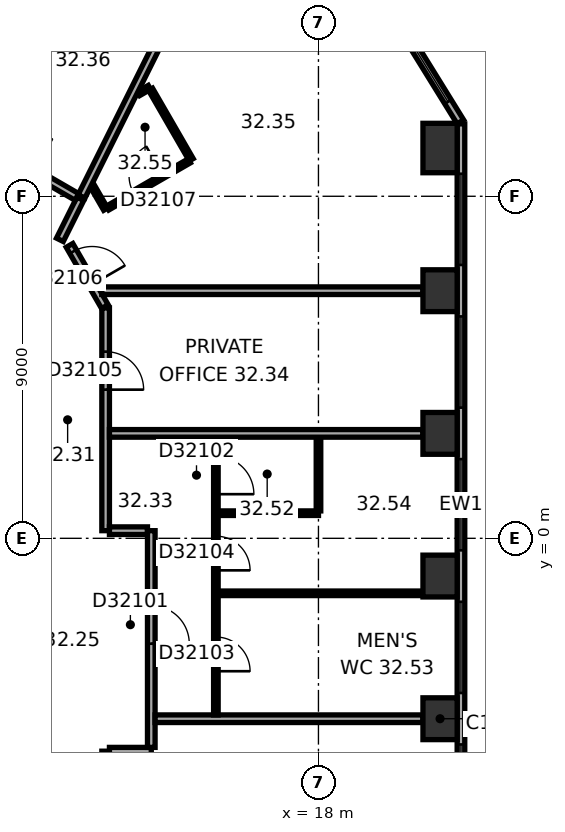
"""IFC4 building model, lengths in metres.
Left out: names, types, materials, properties, quantities, classifications, styles, units other than length and angle.
Written with IfcOpenShell. Run it as: python <this file> out.ifc"""

import sys

from ifc_helpers import new_model, si_unit, direction, frame, frame_2d, origin, origin_2d, place, context, subcontext, project, spatial, rectangle, extrude, element, fill, save


model = new_model("IFC4")
c1 = context("Model", 3, precision=1e-05, world=origin(), true_north=direction((0.0, 1.0)))
c2 = subcontext(c1, "Body", "Model", "MODEL_VIEW")
j1 = project(units=[si_unit("LENGTHUNIT", "METRE"), si_unit("PLANEANGLEUNIT", "RADIAN")], contexts=[c1])
p1 = place(None, origin())
s1 = spatial("IfcSite", under=j1, at=p1, CompositionType="ELEMENT")
p2 = place(p1, origin())
s2 = spatial("IfcBuilding", under=s1, at=p2, CompositionType="ELEMENT")
p3 = place(p2, frame((0.0, 0.0, 131.8)))
s3 = spatial("IfcBuildingStorey", under=s2, at=p3, CompositionType="ELEMENT", Elevation=131.8)
for number, where, z_axis, x_axis in (
    (1, (21.2, -4.747, 0.0), (0.0, 0.0, 1.0), (0.0, 1.0, 0.0)),
    (2, (21.2, -0.993, 0.0), (0.0, 0.0, 1.0), (0.0, 1.0, 0.0)),
    (3, (21.2, 2.761, 0.0), (0.0, 0.0, 1.0), (0.0, 1.0, 0.0)),
    (4, (21.2, 6.515, 0.0), (0.0, 0.0, 1.0), (0.0, 1.0, 0.0)),
):
    element("IfcColumn", number, at=place(p3, frame(where, z_axis=z_axis, x_axis=x_axis)), inside=s3, PredefinedType="COLUMN", context=c2, shape_type="SweptSolid", body=[
        extrude(rectangle(XDim=1.1, YDim=0.9, at=origin_2d()), origin(), (0.0, 0.0, 1.0), 3.7),
    ])
p4 = place(p3, frame((21.2, 10.27, 0.0), z_axis=(0.0, 0.0, 1.0), x_axis=(0.0, 1.0, 0.0)))
e5 = element("IfcColumn", 5, at=p4, inside=s3, PredefinedType="COLUMN", context=c2, shape_type="SweptSolid", body=[
    extrude(rectangle(XDim=1.3, YDim=0.9, at=origin_2d()), origin(), (0.0, 0.0, 1.0), 3.7),
])
p5 = place(p3, frame((21.75, -9.138, 0.0), z_axis=(0.0, 0.0, 1.0), x_axis=(0.0, 1.0, 0.0)))
e6 = element("IfcWall", 6, at=p5, inside=s3, PredefinedType="STANDARD", context=c2, shape_type="SweptSolid", body=[
    extrude(rectangle(XDim=20.044, YDim=0.2, at=frame_2d((10.022, 0.0))), origin(), (0.0, 0.0, 1.0), 3.7),
])
p6 = place(p5, frame((1.314, 0.0, 0.9)))
e7 = element("IfcOpeningElement", 7, at=p6, cuts=e6, PredefinedType="OPENING", context=c2, shape_type="SweptSolid", body=[
    extrude(rectangle(XDim=2.4, YDim=2.0, at=frame_2d((1.2, 1.0))), frame((0.0, 0.11, 0.0), z_axis=(0.0, -1.0, 0.0), x_axis=(1.0, 0.0, 0.0)), (0.0, 0.0, 1.0), 0.22),
])
p7 = place(p5, frame((5.069, 0.0, 0.9)))
e8 = element("IfcOpeningElement", 8, at=p7, cuts=e6, PredefinedType="OPENING", context=c2, shape_type="SweptSolid", body=[
    extrude(rectangle(XDim=2.4, YDim=2.0, at=frame_2d((1.2, 1.0))), frame((0.0, 0.11, 0.0), z_axis=(0.0, -1.0, 0.0), x_axis=(1.0, 0.0, 0.0)), (0.0, 0.0, 1.0), 0.22),
])
p8 = place(p5, frame((8.823, 0.0, 0.9)))
e9 = element("IfcOpeningElement", 9, at=p8, cuts=e6, PredefinedType="OPENING", context=c2, shape_type="SweptSolid", body=[
    extrude(rectangle(XDim=2.4, YDim=2.0, at=frame_2d((1.2, 1.0))), frame((0.0, 0.11, 0.0), z_axis=(0.0, -1.0, 0.0), x_axis=(1.0, 0.0, 0.0)), (0.0, 0.0, 1.0), 0.22),
])
p9 = place(p5, frame((12.577, 0.0, 0.9)))
e10 = element("IfcOpeningElement", 10, at=p9, cuts=e6, PredefinedType="OPENING", context=c2, shape_type="SweptSolid", body=[
    extrude(rectangle(XDim=2.4, YDim=2.0, at=frame_2d((1.2, 1.0))), frame((0.0, 0.11, 0.0), z_axis=(0.0, -1.0, 0.0), x_axis=(1.0, 0.0, 0.0)), (0.0, 0.0, 1.0), 0.22),
])
p10 = place(p5, frame((16.331, 0.0, 0.9)))
e11 = element("IfcOpeningElement", 11, at=p10, cuts=e6, PredefinedType="OPENING", context=c2, shape_type="SweptSolid", body=[
    extrude(rectangle(XDim=2.4, YDim=2.0, at=frame_2d((1.2, 1.0))), frame((0.0, 0.11, 0.0), z_axis=(0.0, -1.0, 0.0), x_axis=(1.0, 0.0, 0.0)), (0.0, 0.0, 1.0), 0.22),
])
p11 = place(p3, frame((21.735, 10.958, 0.0), z_axis=(0.0, 0.0, 1.0), x_axis=(-0.526213807775, 0.850352296702, 0.0)))
e12 = element("IfcWall", 12, at=p11, inside=s3, PredefinedType="STANDARD", context=c2, shape_type="SweptSolid", body=[
    extrude(rectangle(XDim=4.238, YDim=0.2, at=frame_2d((2.119, 0.0))), origin(), (0.0, 0.0, 1.0), 3.7),
])
p12 = place(p11, frame((0.619, 0.0, 0.9)))
e13 = element("IfcOpeningElement", 13, at=p12, cuts=e12, PredefinedType="OPENING", context=c2, shape_type="SweptSolid", body=[
    extrude(rectangle(XDim=3.0, YDim=2.0, at=frame_2d((1.5, 1.0))), frame((0.0, 0.11, 0.0), z_axis=(0.0, -1.0, 0.0), x_axis=(1.0, 0.0, 0.0)), (0.0, 0.0, 1.0), 0.22),
])
p13 = place(p3, frame((11.196, 7.854, 0.0), z_axis=(0.0, 0.0, 1.0), x_axis=(0.446241040303, 0.894912808015, 0.0)))
e14 = element("IfcWall", 14, at=p13, inside=s3, PredefinedType="PARTITIONING", context=c2, shape_type="SweptSolid", body=[
    extrude(rectangle(XDim=1.205, YDim=0.2, at=frame_2d((0.603, 0.0))), origin(), (0.0, 0.0, 1.0), 3.42),
])
p14 = place(p3, frame((11.646, 8.981, 0.0), z_axis=(0.0, 0.0, 1.0), x_axis=(-0.866027142779, 0.499996987961, 0.0)))
e15 = element("IfcWall", 15, at=p14, inside=s3, PredefinedType="PARTITIONING", context=c2, shape_type="SweptSolid", body=[
    extrude(rectangle(XDim=9.597, YDim=0.2, at=frame_2d((4.798, 0.0))), origin(), (0.0, 0.0, 1.0), 3.42),
])
p15 = place(p14, frame((1.331, 0.0, 0.0)))
e16 = element("IfcOpeningElement", 16, at=p15, cuts=e15, PredefinedType="OPENING", context=c2, shape_type="SweptSolid", body=[
    extrude(rectangle(XDim=1.0, YDim=2.1, at=frame_2d((0.5, 1.05))), frame((0.0, 0.11, 0.0), z_axis=(0.0, -1.0, 0.0), x_axis=(1.0, 0.0, 0.0)), (0.0, 0.0, 1.0), 0.22),
])
p16 = place(p14, frame((5.042, 0.0, 0.0)))
e17 = element("IfcOpeningElement", 17, at=p16, cuts=e15, PredefinedType="OPENING", context=c2, shape_type="SweptSolid", body=[
    extrude(rectangle(XDim=1.0, YDim=2.1, at=frame_2d((0.5, 1.05))), frame((0.0, 0.11, 0.0), z_axis=(0.0, -1.0, 0.0), x_axis=(1.0, 0.0, 0.0)), (0.0, 0.0, 1.0), 0.22),
])
p17 = place(p14, frame((8.01, 0.0, 0.0)))
e18 = element("IfcOpeningElement", 18, at=p17, cuts=e15, PredefinedType="OPENING", context=c2, shape_type="SweptSolid", body=[
    extrude(rectangle(XDim=1.0, YDim=2.1, at=frame_2d((0.5, 1.05))), frame((0.0, 0.11, 0.0), z_axis=(0.0, -1.0, 0.0), x_axis=(1.0, 0.0, 0.0)), (0.0, 0.0, 1.0), 0.22),
])
p18 = place(p3, frame((11.73, 17.338, 0.0), z_axis=(0.0, 0.0, 1.0), x_axis=(-0.446193589186, -0.894936467561, 0.0)))
e19 = element("IfcWall", 19, at=p18, inside=s3, PredefinedType="PARTITIONING", context=c2, shape_type="SweptSolid", body=[
    extrude(rectangle(XDim=7.183, YDim=0.2, at=frame_2d((3.591, 0.0))), origin(), (0.0, 0.0, 1.0), 2.87),
])
p19 = place(p3, frame((12.38, 6.097, 0.0), z_axis=(0.0, 0.0, 1.0), x_axis=(-0.499964847546, 0.866045698112, 0.0)))
e20 = element("IfcWall", 20, at=p19, inside=s3, PredefinedType="PARTITIONING", context=c2, shape_type="SweptSolid", body=[
    extrude(rectangle(XDim=1.86, YDim=0.2, at=frame_2d((0.93, 0.0))), origin(), (0.0, 0.0, 1.0), 3.42),
])
p20 = place(p19, frame((0.672, 0.0, 0.0)))
e21 = element("IfcOpeningElement", 21, at=p20, cuts=e20, PredefinedType="OPENING", context=c2, shape_type="SweptSolid", body=[
    extrude(rectangle(XDim=1.0, YDim=2.1, at=frame_2d((0.5, 1.05))), frame((0.0, 0.11, 0.0), z_axis=(0.0, -1.0, 0.0), x_axis=(1.0, 0.0, 0.0)), (0.0, 0.0, 1.0), 0.22),
])
p21 = place(p3, frame((12.4, -6.022, 0.0), z_axis=(0.0, 0.0, 1.0), x_axis=(0.0, 1.0, 0.0)))
e22 = element("IfcWall", 22, at=p21, inside=s3, PredefinedType="PARTITIONING", context=c2, shape_type="SweptSolid", body=[
    extrude(rectangle(XDim=0.421, YDim=0.2, at=frame_2d((0.21, 0.0))), origin(), (0.0, 0.0, 1.0), 3.42),
])
p22 = place(p3, frame((12.4, 0.201, 0.0), z_axis=(0.0, 0.0, 1.0), x_axis=(0.0, 1.0, 0.0)))
e23 = element("IfcWall", 23, at=p22, inside=s3, PredefinedType="PARTITIONING", context=c2, shape_type="SweptSolid", body=[
    extrude(rectangle(XDim=5.861, YDim=0.2, at=frame_2d((2.931, 0.0))), origin(), (0.0, 0.0, 1.0), 3.42),
])
p23 = place(p22, frame((3.711, 0.0, 0.0)))
e24 = element("IfcOpeningElement", 24, at=p23, cuts=e23, PredefinedType="OPENING", context=c2, shape_type="SweptSolid", body=[
    extrude(rectangle(XDim=1.0, YDim=2.1, at=frame_2d((0.5, 1.05))), frame((0.0, 0.11, 0.0), z_axis=(0.0, -1.0, 0.0), x_axis=(1.0, 0.0, 0.0)), (0.0, 0.0, 1.0), 0.22),
])
p24 = place(p3, frame((12.401, 8.661, 0.0), z_axis=(0.0, 0.0, 1.0), x_axis=(-0.499831418649, 0.866122712398, 0.0)))
e25 = element("IfcWall", 25, at=p24, inside=s3, PredefinedType="PARTITIONING", context=c2, shape_type="SweptSolid", body=[
    extrude(rectangle(XDim=0.711, YDim=0.12, at=frame_2d((0.355, 0.0))), origin(), (0.0, 0.0, 1.0), 3.42),
])
p25 = place(p3, frame((12.5, -5.601, 0.0), z_axis=(0.0, 0.0, 1.0), x_axis=(1.0, 0.0, 0.0)))
e26 = element("IfcWall", 26, at=p25, inside=s3, PredefinedType="PARTITIONING", context=c2, shape_type="SweptSolid", body=[
    extrude(rectangle(XDim=1.101, YDim=0.2, at=frame_2d((0.551, 0.0))), origin(), (0.0, 0.0, 1.0), 3.42),
])
p26 = place(p3, frame((13.269, 11.702, 0.0), z_axis=(0.0, 0.0, 1.0), x_axis=(0.865936922628, 0.500153222552, 0.0)))
e27 = element("IfcWall", 27, at=p26, inside=s3, PredefinedType="PARTITIONING", context=c2, shape_type="SweptSolid", body=[
    extrude(rectangle(XDim=0.327, YDim=0.12, at=frame_2d((0.164, 0.0))), origin(), (0.0, 0.0, 1.0), 3.42),
])
p27 = place(p3, frame((13.501, 0.201, 0.0), z_axis=(0.0, 0.0, 1.0), x_axis=(-1.0, 0.0, 0.0)))
e28 = element("IfcWall", 28, at=p27, inside=s3, PredefinedType="PARTITIONING", context=c2, shape_type="SweptSolid", body=[
    extrude(rectangle(XDim=1.001, YDim=0.2, at=frame_2d((0.5, 0.0))), origin(), (0.0, 0.0, 1.0), 3.42),
])
p28 = place(p3, frame((13.583, 11.814, 0.0), z_axis=(0.0, 0.0, 1.0), x_axis=(0.500028586798, -0.86600889856, 0.0)))
e29 = element("IfcWall", 29, at=p28, inside=s3, PredefinedType="PARTITIONING", context=c2, shape_type="SweptSolid", body=[
    extrude(rectangle(XDim=2.14, YDim=0.12, at=frame_2d((1.07, 0.0))), origin(), (0.0, 0.0, 1.0), 3.42),
])
p29 = place(p3, frame((13.601, -5.501, 0.0), z_axis=(0.0, 0.0, 1.0), x_axis=(0.0, 1.0, 0.0)))
e30 = element("IfcWall", 30, at=p29, inside=s3, PredefinedType="PARTITIONING", context=c2, shape_type="SweptSolid", body=[
    extrude(rectangle(XDim=5.702, YDim=0.2, at=frame_2d((2.851, 0.0))), origin(), (0.0, 0.0, 1.0), 3.42),
])
p30 = place(p29, frame((2.728, 0.0, 0.0)))
e31 = element("IfcOpeningElement", 31, at=p30, cuts=e30, PredefinedType="OPENING", context=c2, shape_type="SweptSolid", body=[
    extrude(rectangle(XDim=1.0, YDim=2.1, at=frame_2d((0.5, 1.05))), frame((0.0, 0.11, 0.0), z_axis=(0.0, -1.0, 0.0), x_axis=(1.0, 0.0, 0.0)), (0.0, 0.0, 1.0), 0.22),
])
p31 = place(p3, frame((13.701, -4.747, 0.0), z_axis=(0.0, 0.0, 1.0), x_axis=(1.0, 0.0, 0.0)))
e32 = element("IfcWall", 32, at=p31, inside=s3, PredefinedType="PARTITIONING", context=c2, shape_type="SweptSolid", body=[
    extrude(rectangle(XDim=7.049, YDim=0.2, at=frame_2d((3.524, 0.0))), origin(), (0.0, 0.0, 1.0), 3.42),
])
p32 = place(p3, frame((14.601, 9.931, 0.0), z_axis=(0.0, 0.0, 1.0), x_axis=(-0.866023285932, -0.50000366821, 0.0)))
e33 = element("IfcWall", 33, at=p32, inside=s3, PredefinedType="PARTITIONING", context=c2, shape_type="SweptSolid", body=[
    extrude(rectangle(XDim=2.48, YDim=0.12, at=frame_2d((1.24, 0.0))), origin(), (0.0, 0.0, 1.0), 3.42),
])
p33 = place(p32, frame((0.79, 0.0, 0.0)))
e34 = element("IfcOpeningElement", 34, at=p33, cuts=e33, PredefinedType="OPENING", context=c2, shape_type="SweptSolid", body=[
    extrude(rectangle(XDim=0.9, YDim=2.1, at=frame_2d((0.45, 1.05))), frame((0.0, 0.07, 0.0), z_axis=(0.0, -1.0, 0.0), x_axis=(1.0, 0.0, 0.0)), (0.0, 0.0, 1.0), 0.14),
])
p34 = place(p3, frame((15.09, 15.663, 0.0), z_axis=(0.0, 0.0, 1.0), x_axis=(-0.446203977428, -0.89493128816, 0.0)))
e35 = element("IfcWall", 35, at=p34, inside=s3, PredefinedType="PARTITIONING", context=c2, shape_type="SweptSolid", body=[
    extrude(rectangle(XDim=7.45, YDim=0.2, at=frame_2d((3.725, 0.0))), origin(), (0.0, 0.0, 1.0), 3.42),
])
p35 = place(p3, frame((15.301, -4.647, 0.0), z_axis=(0.0, 0.0, 1.0), x_axis=(0.0, 1.0, 0.0)))
e36 = element("IfcWall", 36, at=p35, inside=s3, PredefinedType="PARTITIONING", context=c2, shape_type="SweptSolid", body=[
    extrude(rectangle(XDim=7.308, YDim=0.12, at=frame_2d((3.654, 0.0))), origin(), (0.0, 0.0, 1.0), 3.42),
])
p36 = place(p35, frame((5.808, 0.0, 0.0)))
e37 = element("IfcOpeningElement", 37, at=p36, cuts=e36, PredefinedType="OPENING", context=c2, shape_type="SweptSolid", body=[
    extrude(rectangle(XDim=1.0, YDim=2.1, at=frame_2d((0.5, 1.05))), frame((0.0, 0.07, 0.0), z_axis=(0.0, -1.0, 0.0), x_axis=(1.0, 0.0, 0.0)), (0.0, 0.0, 1.0), 0.14),
])
p37 = place(p35, frame((1.15, 0.0, 0.0)))
e38 = element("IfcOpeningElement", 38, at=p37, cuts=e36, PredefinedType="OPENING", context=c2, shape_type="SweptSolid", body=[
    extrude(rectangle(XDim=0.9, YDim=2.1, at=frame_2d((0.45, 1.05))), frame((0.0, 0.07, 0.0), z_axis=(0.0, -1.0, 0.0), x_axis=(1.0, 0.0, 0.0)), (0.0, 0.0, 1.0), 0.14),
])
p38 = place(p35, frame((3.804, 0.0, 0.0)))
e39 = element("IfcOpeningElement", 39, at=p38, cuts=e36, PredefinedType="OPENING", context=c2, shape_type="SweptSolid", body=[
    extrude(rectangle(XDim=0.9, YDim=2.1, at=frame_2d((0.45, 1.05))), frame((0.0, 0.07, 0.0), z_axis=(0.0, -1.0, 0.0), x_axis=(1.0, 0.0, 0.0)), (0.0, 0.0, 1.0), 0.14),
])
p39 = place(p3, frame((15.361, 0.661, 0.0), z_axis=(0.0, 0.0, 1.0), x_axis=(1.0, 0.0, 0.0)))
e40 = element("IfcWall", 40, at=p39, inside=s3, PredefinedType="PARTITIONING", context=c2, shape_type="SweptSolid", body=[
    extrude(rectangle(XDim=2.64, YDim=0.12, at=frame_2d((1.32, 0.0))), origin(), (0.0, 0.0, 1.0), 3.42),
])
p40 = place(p3, frame((18.001, 0.721, 0.0), z_axis=(0.0, 0.0, 1.0), x_axis=(0.0, 1.0, 0.0)))
e41 = element("IfcWall", 41, at=p40, inside=s3, PredefinedType="PARTITIONING", context=c2, shape_type="SweptSolid", body=[
    extrude(rectangle(XDim=1.94, YDim=0.12, at=frame_2d((0.97, 0.0))), origin(), (0.0, 0.0, 1.0), 3.42),
])
p41 = place(p3, frame((20.75, -1.447, 0.0), z_axis=(0.0, 0.0, 1.0), x_axis=(-1.0, 0.0, 0.0)))
e42 = element("IfcWall", 42, at=p41, inside=s3, PredefinedType="PARTITIONING", context=c2, shape_type="SweptSolid", body=[
    extrude(rectangle(XDim=5.389, YDim=0.12, at=frame_2d((2.694, 0.0))), origin(), (0.0, 0.0, 1.0), 2.87),
])
p42 = place(p3, frame((20.75, 2.761, 0.0), z_axis=(0.0, 0.0, 1.0), x_axis=(-1.0, 0.0, 0.0)))
e43 = element("IfcWall", 43, at=p42, inside=s3, PredefinedType="PARTITIONING", context=c2, shape_type="SweptSolid", body=[
    extrude(rectangle(XDim=8.25, YDim=0.2, at=frame_2d((4.125, 0.0))), origin(), (0.0, 0.0, 1.0), 3.42),
])
p43 = place(p3, frame((20.75, 6.515, 0.0), z_axis=(0.0, 0.0, 1.0), x_axis=(-1.0, 0.0, 0.0)))
e44 = element("IfcWall", 44, at=p43, inside=s3, PredefinedType="PARTITIONING", context=c2, shape_type="SweptSolid", body=[
    extrude(rectangle(XDim=8.452, YDim=0.2, at=frame_2d((4.226, 0.0))), origin(), (0.0, 0.0, 1.0), 3.42),
])
p44 = place(p6, origin())
e45 = element("IfcWindow", 45, at=p44, inside=s3, PartitioningType="SINGLE_PANEL", PredefinedType="WINDOW", context=c2, shape_type="SweptSolid", body=[
    extrude(rectangle(XDim=2.4, YDim=2.0, at=frame_2d((1.2, 1.0))), frame((0.0, 0.03, 0.0), z_axis=(0.0, -1.0, 0.0), x_axis=(1.0, 0.0, 0.0)), (0.0, 0.0, 1.0), 0.06),
])
fill(e7, e45)
p45 = place(p7, origin())
e46 = element("IfcWindow", 46, at=p45, inside=s3, PartitioningType="SINGLE_PANEL", PredefinedType="WINDOW", context=c2, shape_type="SweptSolid", body=[
    extrude(rectangle(XDim=2.4, YDim=2.0, at=frame_2d((1.2, 1.0))), frame((0.0, 0.03, 0.0), z_axis=(0.0, -1.0, 0.0), x_axis=(1.0, 0.0, 0.0)), (0.0, 0.0, 1.0), 0.06),
])
fill(e8, e46)
p46 = place(p8, origin())
e47 = element("IfcWindow", 47, at=p46, inside=s3, PartitioningType="SINGLE_PANEL", PredefinedType="WINDOW", context=c2, shape_type="SweptSolid", body=[
    extrude(rectangle(XDim=2.4, YDim=2.0, at=frame_2d((1.2, 1.0))), frame((0.0, 0.03, 0.0), z_axis=(0.0, -1.0, 0.0), x_axis=(1.0, 0.0, 0.0)), (0.0, 0.0, 1.0), 0.06),
])
fill(e9, e47)
p47 = place(p9, origin())
e48 = element("IfcWindow", 48, at=p47, inside=s3, PartitioningType="SINGLE_PANEL", PredefinedType="WINDOW", context=c2, shape_type="SweptSolid", body=[
    extrude(rectangle(XDim=2.4, YDim=2.0, at=frame_2d((1.2, 1.0))), frame((0.0, 0.03, 0.0), z_axis=(0.0, -1.0, 0.0), x_axis=(1.0, 0.0, 0.0)), (0.0, 0.0, 1.0), 0.06),
])
fill(e10, e48)
p48 = place(p10, origin())
e49 = element("IfcWindow", 49, at=p48, inside=s3, PartitioningType="SINGLE_PANEL", PredefinedType="WINDOW", context=c2, shape_type="SweptSolid", body=[
    extrude(rectangle(XDim=2.4, YDim=2.0, at=frame_2d((1.2, 1.0))), frame((0.0, 0.03, 0.0), z_axis=(0.0, -1.0, 0.0), x_axis=(1.0, 0.0, 0.0)), (0.0, 0.0, 1.0), 0.06),
])
fill(e11, e49)
p49 = place(p12, origin())
e50 = element("IfcWindow", 50, at=p49, inside=s3, PartitioningType="SINGLE_PANEL", PredefinedType="WINDOW", context=c2, shape_type="SweptSolid", body=[
    extrude(rectangle(XDim=3.0, YDim=2.0, at=frame_2d((1.5, 1.0))), frame((0.0, 0.03, 0.0), z_axis=(0.0, -1.0, 0.0), x_axis=(1.0, 0.0, 0.0)), (0.0, 0.0, 1.0), 0.06),
])
fill(e13, e50)
p50 = place(p30, origin())
e51 = element("IfcDoor", 51, at=p50, inside=s3, OperationType="SINGLE_SWING_LEFT", PredefinedType="DOOR", context=c2, shape_type="SweptSolid", body=[
    extrude(rectangle(XDim=1.0, YDim=2.1, at=frame_2d((0.5, 1.05))), frame((0.0, 0.025, 0.0), z_axis=(0.0, -1.0, 0.0), x_axis=(1.0, 0.0, 0.0)), (0.0, 0.0, 1.0), 0.05),
])
fill(e31, e51)
p51 = place(p36, origin())
e52 = element("IfcDoor", 52, at=p51, inside=s3, OperationType="SINGLE_SWING_LEFT", PredefinedType="DOOR", context=c2, shape_type="SweptSolid", body=[
    extrude(rectangle(XDim=1.0, YDim=2.1, at=frame_2d((0.5, 1.05))), frame((0.0, 0.025, 0.0), z_axis=(0.0, -1.0, 0.0), x_axis=(1.0, 0.0, 0.0)), (0.0, 0.0, 1.0), 0.05),
])
fill(e37, e52)
p52 = place(p37, origin())
e53 = element("IfcDoor", 53, at=p52, inside=s3, OperationType="SINGLE_SWING_LEFT", PredefinedType="DOOR", context=c2, shape_type="SweptSolid", body=[
    extrude(rectangle(XDim=0.9, YDim=2.1, at=frame_2d((0.45, 1.05))), frame((0.0, 0.025, 0.0), z_axis=(0.0, -1.0, 0.0), x_axis=(1.0, 0.0, 0.0)), (0.0, 0.0, 1.0), 0.05),
])
fill(e38, e53)
p53 = place(p38, origin())
e54 = element("IfcDoor", 54, at=p53, inside=s3, OperationType="SINGLE_SWING_LEFT", PredefinedType="DOOR", context=c2, shape_type="SweptSolid", body=[
    extrude(rectangle(XDim=0.9, YDim=2.1, at=frame_2d((0.45, 1.05))), frame((0.0, 0.025, 0.0), z_axis=(0.0, -1.0, 0.0), x_axis=(1.0, 0.0, 0.0)), (0.0, 0.0, 1.0), 0.05),
])
fill(e39, e54)
p54 = place(p23, origin())
e55 = element("IfcDoor", 55, at=p54, inside=s3, OperationType="SINGLE_SWING_LEFT", PredefinedType="DOOR", context=c2, shape_type="SweptSolid", body=[
    extrude(rectangle(XDim=1.0, YDim=2.1, at=frame_2d((0.5, 1.05))), frame((0.0, 0.025, 0.0), z_axis=(0.0, -1.0, 0.0), x_axis=(1.0, 0.0, 0.0)), (0.0, 0.0, 1.0), 0.05),
])
fill(e24, e55)
p55 = place(p20, origin())
e56 = element("IfcDoor", 56, at=p55, inside=s3, OperationType="SINGLE_SWING_LEFT", PredefinedType="DOOR", context=c2, shape_type="SweptSolid", body=[
    extrude(rectangle(XDim=1.0, YDim=2.1, at=frame_2d((0.5, 1.05))), frame((0.0, 0.025, 0.0), z_axis=(0.0, -1.0, 0.0), x_axis=(1.0, 0.0, 0.0)), (0.0, 0.0, 1.0), 0.05),
])
fill(e21, e56)
p56 = place(p33, origin())
e57 = element("IfcDoor", 57, at=p56, inside=s3, OperationType="SINGLE_SWING_LEFT", PredefinedType="DOOR", context=c2, shape_type="SweptSolid", body=[
    extrude(rectangle(XDim=0.9, YDim=2.1, at=frame_2d((0.45, 1.05))), frame((0.0, 0.025, 0.0), z_axis=(0.0, -1.0, 0.0), x_axis=(1.0, 0.0, 0.0)), (0.0, 0.0, 1.0), 0.05),
])
fill(e34, e57)
save(model, sys.argv[1])
